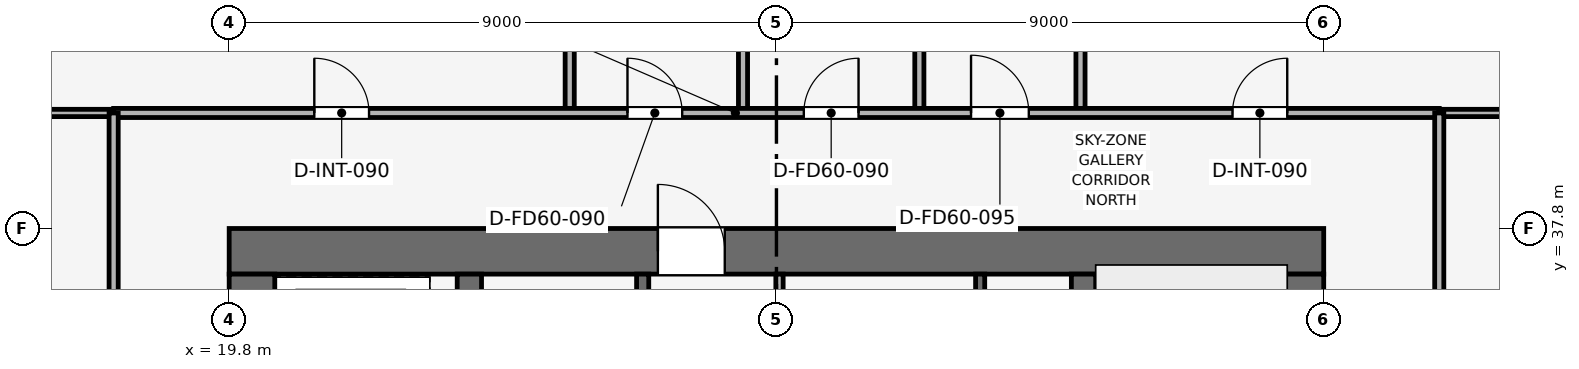
"""IFC4 building model, lengths in metres.
Left out: names, types, materials, properties, quantities, classifications, styles, units other than length and angle.
Written with IfcOpenShell. Run it as: python <this file> out.ifc"""

import sys

from ifc_helpers import new_model, si_unit, direction, frame, frame_2d, origin, place, context, subcontext, project, spatial, rectangle, extrude, element, fill, save


model = new_model("IFC4")
c1 = context("Model", 3, precision=1e-05, world=origin(), true_north=direction((0.0, 1.0)))
c2 = subcontext(c1, "Body", "Model", "MODEL_VIEW")
j1 = project(units=[si_unit("LENGTHUNIT", "METRE"), si_unit("PLANEANGLEUNIT", "RADIAN")], contexts=[c1])
p1 = place(None, origin())
s1 = spatial("IfcSite", under=j1, at=p1, CompositionType="ELEMENT")
p2 = place(p1, origin())
s2 = spatial("IfcBuilding", under=s1, at=p2, CompositionType="ELEMENT")
p3 = place(p2, frame((0.0, 0.0, 257.85)))
s3 = spatial("IfcBuildingStorey", under=s2, at=p3, CompositionType="ELEMENT", Elevation=257.85)
p4 = place(p3, frame((19.8, 37.425, 0.0), z_axis=(0.0, 0.0, 1.0), x_axis=(1.0, 0.0, 0.0)))
e1 = element("IfcWall", 1, at=p4, inside=s3, PredefinedType="SHEAR", context=c2, shape_type="SweptSolid", body=[
    extrude(rectangle(XDim=18.0, YDim=0.75, at=frame_2d((9.0, 0.0))), origin(), (0.0, 0.0, 1.0), 3.75),
])
p5 = place(p4, frame((7.05, 0.0, 0.0)))
e2 = element("IfcOpeningElement", 2, at=p5, cuts=e1, PredefinedType="OPENING", context=c2, shape_type="SweptSolid", body=[
    extrude(rectangle(XDim=1.1, YDim=2.15, at=frame_2d((0.55, 1.075))), frame((0.0, 0.385, 0.0), z_axis=(0.0, -1.0, 0.0), x_axis=(1.0, 0.0, 0.0)), (0.0, 0.0, 1.0), 0.77),
])
p6 = place(p3, frame((20.175, 20.55, 0.0), z_axis=(0.0, 0.0, 1.0), x_axis=(0.0, 1.0, 0.0)))
e3 = element("IfcWall", 3, at=p6, inside=s3, PredefinedType="SHEAR", context=c2, shape_type="SweptSolid", body=[
    extrude(rectangle(XDim=16.5, YDim=0.75, at=frame_2d((8.25, 0.0))), origin(), (0.0, 0.0, 1.0), 3.75),
])
p7 = place(p6, frame((10.25, 0.0, 0.0)))
e4 = element("IfcOpeningElement", 4, at=p7, cuts=e3, PredefinedType="OPENING", context=c2, shape_type="SweptSolid", body=[
    extrude(rectangle(XDim=1.1, YDim=2.15, at=frame_2d((0.55, 1.075))), frame((0.0, 0.385, 0.0), z_axis=(0.0, -1.0, 0.0), x_axis=(1.0, 0.0, 0.0)), (0.0, 0.0, 1.0), 0.77),
])
p8 = place(p3, frame((37.425, 20.55, 0.0), z_axis=(0.0, 0.0, 1.0), x_axis=(0.0, 1.0, 0.0)))
e5 = element("IfcWall", 5, at=p8, inside=s3, PredefinedType="SHEAR", context=c2, shape_type="SweptSolid", body=[
    extrude(rectangle(XDim=16.5, YDim=0.75, at=frame_2d((8.25, 0.0))), origin(), (0.0, 0.0, 1.0), 3.75),
])
p9 = place(p8, frame((4.75, 0.0, 0.0)))
e6 = element("IfcOpeningElement", 6, at=p9, cuts=e5, PredefinedType="OPENING", context=c2, shape_type="SweptSolid", body=[
    extrude(rectangle(XDim=1.1, YDim=2.15, at=frame_2d((0.55, 1.075))), frame((0.0, 0.385, 0.0), z_axis=(0.0, -1.0, 0.0), x_axis=(1.0, 0.0, 0.0)), (0.0, 0.0, 1.0), 0.77),
])
for number, where, z_axis, x_axis in (
    (7, (23.75, 20.55, 0.0), (0.0, 0.0, 1.0), (0.0, 1.0, 0.0)),
    (8, (33.85, 20.55, 0.0), (0.0, 0.0, 1.0), (0.0, 1.0, 0.0)),
):
    element("IfcWall", number, at=place(p3, frame(where, z_axis=z_axis, x_axis=x_axis)), inside=s3, PredefinedType="SHEAR", context=c2, shape_type="SweptSolid", body=[
        extrude(rectangle(XDim=16.5, YDim=0.4, at=frame_2d((8.25, 0.0))), origin(), (0.0, 0.0, 1.0), 3.75),
    ])
p10 = place(p3, frame((32.15, 34.0, 0.0), z_axis=(0.0, 0.0, 1.0), x_axis=(0.0, 1.0, 0.0)))
e9 = element("IfcWall", 9, at=p10, inside=s3, PredefinedType="SHEAR", context=c2, shape_type="SweptSolid", body=[
    extrude(rectangle(XDim=3.05, YDim=0.15, at=frame_2d((1.525, 0.0))), origin(), (0.0, 0.0, 1.0), 3.5),
])
p11 = place(p3, frame((26.6, 34.0, 0.0), z_axis=(0.0, 0.0, 1.0), x_axis=(0.0, 1.0, 0.0)))
e10 = element("IfcWall", 10, at=p11, inside=s3, PredefinedType="SHEAR", context=c2, shape_type="SweptSolid", body=[
    extrude(rectangle(XDim=3.05, YDim=0.2, at=frame_2d((1.525, 0.0))), origin(), (0.0, 0.0, 1.0), 3.5),
])
p12 = place(p11, frame((0.75, 0.0, 0.0)))
e11 = element("IfcOpeningElement", 11, at=p12, cuts=e10, PredefinedType="OPENING", context=c2, shape_type="SweptSolid", body=[
    extrude(rectangle(XDim=1.1, YDim=2.15, at=frame_2d((0.55, 1.075))), frame((0.0, 0.11, 0.0), z_axis=(0.0, -1.0, 0.0), x_axis=(1.0, 0.0, 0.0)), (0.0, 0.0, 1.0), 0.22),
])
p13 = place(p3, frame((28.85, 33.925, 0.0), z_axis=(0.0, 0.0, 1.0), x_axis=(0.0, 1.0, 0.0)))
e12 = element("IfcWall", 12, at=p13, inside=s3, PredefinedType="PARTITIONING", context=c2, shape_type="SweptSolid", body=[
    extrude(rectangle(XDim=3.125, YDim=0.12, at=frame_2d((1.562, 0.0))), origin(), (0.0, 0.0, 1.0), 3.5),
])
p14 = place(p13, frame((0.25, 0.0, 0.0)))
e13 = element("IfcOpeningElement", 13, at=p14, cuts=e12, PredefinedType="OPENING", context=c2, shape_type="SweptSolid", body=[
    extrude(rectangle(XDim=0.85, YDim=2.1, at=frame_2d((0.425, 1.05))), frame((0.0, 0.07, 0.0), z_axis=(0.0, -1.0, 0.0), x_axis=(1.0, 0.0, 0.0)), (0.0, 0.0, 1.0), 0.14),
])
p15 = place(p13, frame((1.72, 0.0, 0.0)))
e14 = element("IfcOpeningElement", 14, at=p15, cuts=e12, PredefinedType="OPENING", context=c2, shape_type="SweptSolid", body=[
    extrude(rectangle(XDim=0.85, YDim=2.1, at=frame_2d((0.425, 1.05))), frame((0.0, 0.07, 0.0), z_axis=(0.0, -1.0, 0.0), x_axis=(1.0, 0.0, 0.0)), (0.0, 0.0, 1.0), 0.14),
])
p16 = place(p3, frame((25.4, 39.7, 0.0), z_axis=(0.0, 0.0, 1.0), x_axis=(0.0, 1.0, 0.0)))
e15 = element("IfcWall", 15, at=p16, inside=s3, PredefinedType="PARTITIONING", context=c2, shape_type="SweptSolid", body=[
    extrude(rectangle(XDim=13.87, YDim=0.15, at=frame_2d((6.935, 0.0))), origin(), (0.0, 0.0, 1.0), 3.085),
])
p17 = place(p16, frame((8.035, 0.0, 0.0)))
e16 = element("IfcOpeningElement", 16, at=p17, cuts=e15, PredefinedType="OPENING", context=c2, shape_type="SweptSolid", body=[
    extrude(rectangle(XDim=0.9, YDim=2.1, at=frame_2d((0.45, 1.05))), frame((0.0, 0.085, 0.0), z_axis=(0.0, -1.0, 0.0), x_axis=(1.0, 0.0, 0.0)), (0.0, 0.0, 1.0), 0.17),
])
p18 = place(p3, frame((33.8, 39.7, 0.0), z_axis=(0.0, 0.0, 1.0), x_axis=(0.0, 1.0, 0.0)))
e17 = element("IfcWall", 17, at=p18, inside=s3, PredefinedType="PARTITIONING", context=c2, shape_type="SweptSolid", body=[
    extrude(rectangle(XDim=13.87, YDim=0.15, at=frame_2d((6.935, 0.0))), origin(), (0.0, 0.0, 1.0), 3.085),
])
for number, where, z_axis, x_axis in (
    (18, (28.25, 39.7, 0.0), (0.0, 0.0, 1.0), (0.0, 1.0, 0.0)),
    (19, (31.15, 39.7, 0.0), (0.0, 0.0, 1.0), (0.0, 1.0, 0.0)),
):
    element("IfcWall", number, at=place(p3, frame(where, z_axis=z_axis, x_axis=x_axis)), inside=s3, PredefinedType="PARTITIONING", context=c2, shape_type="SweptSolid", body=[
        extrude(rectangle(XDim=3.1, YDim=0.15, at=frame_2d((1.55, 0.0))), origin(), (0.0, 0.0, 1.0), 3.5),
    ])
p19 = place(p3, frame((4.03, 39.7, 0.0), z_axis=(0.0, 0.0, 1.0), x_axis=(1.0, 0.0, 0.0)))
e20 = element("IfcWall", 20, at=p19, inside=s3, PredefinedType="PARTITIONING", context=c2, shape_type="SweptSolid", body=[
    extrude(rectangle(XDim=13.87, YDim=0.12, at=frame_2d((6.935, 0.0))), origin(), (0.0, 0.0, 1.0), 3.085),
])
p20 = place(p3, frame((39.7, 39.7, 0.0), z_axis=(0.0, 0.0, 1.0), x_axis=(1.0, 0.0, 0.0)))
e21 = element("IfcWall", 21, at=p20, inside=s3, PredefinedType="PARTITIONING", context=c2, shape_type="SweptSolid", body=[
    extrude(rectangle(XDim=13.87, YDim=0.12, at=frame_2d((6.935, 0.0))), origin(), (0.0, 0.0, 1.0), 3.085),
])
p21 = place(p3, frame((17.9, 39.7, 0.0), z_axis=(0.0, 0.0, 1.0), x_axis=(1.0, 0.0, 0.0)))
e22 = element("IfcWall", 22, at=p21, inside=s3, PredefinedType="PARTITIONING", context=c2, shape_type="SweptSolid", body=[
    extrude(rectangle(XDim=21.8, YDim=0.15, at=frame_2d((10.9, 0.0))), origin(), (0.0, 0.0, 1.0), 3.085),
])
p22 = place(p21, frame((3.3, 0.0, 0.0)))
e23 = element("IfcOpeningElement", 23, at=p22, cuts=e22, PredefinedType="OPENING", context=c2, shape_type="SweptSolid", body=[
    extrude(rectangle(XDim=0.9, YDim=2.1, at=frame_2d((0.45, 1.05))), frame((0.0, 0.085, 0.0), z_axis=(0.0, -1.0, 0.0), x_axis=(1.0, 0.0, 0.0)), (0.0, 0.0, 1.0), 0.17),
])
p23 = place(p21, frame((8.45, 0.0, 0.0)))
e24 = element("IfcOpeningElement", 24, at=p23, cuts=e22, PredefinedType="OPENING", context=c2, shape_type="SweptSolid", body=[
    extrude(rectangle(XDim=0.9, YDim=2.1, at=frame_2d((0.45, 1.05))), frame((0.0, 0.085, 0.0), z_axis=(0.0, -1.0, 0.0), x_axis=(1.0, 0.0, 0.0)), (0.0, 0.0, 1.0), 0.17),
])
p24 = place(p21, frame((11.35, 0.0, 0.0)))
e25 = element("IfcOpeningElement", 25, at=p24, cuts=e22, PredefinedType="OPENING", context=c2, shape_type="SweptSolid", body=[
    extrude(rectangle(XDim=0.9, YDim=2.1, at=frame_2d((0.45, 1.05))), frame((0.0, 0.085, 0.0), z_axis=(0.0, -1.0, 0.0), x_axis=(1.0, 0.0, 0.0)), (0.0, 0.0, 1.0), 0.17),
])
p25 = place(p21, frame((14.1, 0.0, 0.0)))
e26 = element("IfcOpeningElement", 26, at=p25, cuts=e22, PredefinedType="OPENING", context=c2, shape_type="SweptSolid", body=[
    extrude(rectangle(XDim=0.95, YDim=2.1, at=frame_2d((0.475, 1.05))), frame((0.0, 0.085, 0.0), z_axis=(0.0, -1.0, 0.0), x_axis=(1.0, 0.0, 0.0)), (0.0, 0.0, 1.0), 0.17),
])
p26 = place(p21, frame((18.4, 0.0, 0.0)))
e27 = element("IfcOpeningElement", 27, at=p26, cuts=e22, PredefinedType="OPENING", context=c2, shape_type="SweptSolid", body=[
    extrude(rectangle(XDim=0.9, YDim=2.1, at=frame_2d((0.45, 1.05))), frame((0.0, 0.085, 0.0), z_axis=(0.0, -1.0, 0.0), x_axis=(1.0, 0.0, 0.0)), (0.0, 0.0, 1.0), 0.17),
])
p27 = place(p3, frame((17.9, 10.8, 0.0), z_axis=(0.0, 0.0, 1.0), x_axis=(0.0, 1.0, 0.0)))
e28 = element("IfcWall", 28, at=p27, inside=s3, PredefinedType="PARTITIONING", context=c2, shape_type="SweptSolid", body=[
    extrude(rectangle(XDim=28.9, YDim=0.15, at=frame_2d((14.45, 0.0))), origin(), (0.0, 0.0, 1.0), 3.085),
])
p28 = place(p27, frame((0.7, 0.0, 0.0)))
e29 = element("IfcOpeningElement", 29, at=p28, cuts=e28, PredefinedType="OPENING", context=c2, shape_type="SweptSolid", body=[
    extrude(rectangle(XDim=0.9, YDim=2.1, at=frame_2d((0.45, 1.05))), frame((0.0, 0.085, 0.0), z_axis=(0.0, -1.0, 0.0), x_axis=(1.0, 0.0, 0.0)), (0.0, 0.0, 1.0), 0.17),
])
p29 = place(p27, frame((5.952, 0.0, 0.0)))
e30 = element("IfcOpeningElement", 30, at=p29, cuts=e28, PredefinedType="OPENING", context=c2, shape_type="SweptSolid", body=[
    extrude(rectangle(XDim=0.9, YDim=2.1, at=frame_2d((0.45, 1.05))), frame((0.0, 0.085, 0.0), z_axis=(0.0, -1.0, 0.0), x_axis=(1.0, 0.0, 0.0)), (0.0, 0.0, 1.0), 0.17),
])
p30 = place(p27, frame((14.02, 0.0, 0.0)))
e31 = element("IfcOpeningElement", 31, at=p30, cuts=e28, PredefinedType="OPENING", context=c2, shape_type="SweptSolid", body=[
    extrude(rectangle(XDim=0.9, YDim=2.1, at=frame_2d((0.45, 1.05))), frame((0.0, 0.085, 0.0), z_axis=(0.0, -1.0, 0.0), x_axis=(1.0, 0.0, 0.0)), (0.0, 0.0, 1.0), 0.17),
])
p31 = place(p27, frame((23.217, 0.0, 0.0)))
e32 = element("IfcOpeningElement", 32, at=p31, cuts=e28, PredefinedType="OPENING", context=c2, shape_type="SweptSolid", body=[
    extrude(rectangle(XDim=0.9, YDim=2.1, at=frame_2d((0.45, 1.05))), frame((0.0, 0.085, 0.0), z_axis=(0.0, -1.0, 0.0), x_axis=(1.0, 0.0, 0.0)), (0.0, 0.0, 1.0), 0.17),
])
p32 = place(p3, frame((39.7, 24.4, 0.0), z_axis=(0.0, 0.0, 1.0), x_axis=(0.0, 1.0, 0.0)))
e33 = element("IfcWall", 33, at=p32, inside=s3, PredefinedType="PARTITIONING", context=c2, shape_type="SweptSolid", body=[
    extrude(rectangle(XDim=15.3, YDim=0.15, at=frame_2d((7.65, 0.0))), origin(), (0.0, 0.0, 1.0), 3.085),
])
p33 = place(p32, frame((3.032, 0.0, 0.0)))
e34 = element("IfcOpeningElement", 34, at=p33, cuts=e33, PredefinedType="OPENING", context=c2, shape_type="SweptSolid", body=[
    extrude(rectangle(XDim=0.9, YDim=2.1, at=frame_2d((0.45, 1.05))), frame((0.0, 0.085, 0.0), z_axis=(0.0, -1.0, 0.0), x_axis=(1.0, 0.0, 0.0)), (0.0, 0.0, 1.0), 0.17),
])
p34 = place(p32, frame((10.682, 0.0, 0.0)))
e35 = element("IfcOpeningElement", 35, at=p34, cuts=e33, PredefinedType="OPENING", context=c2, shape_type="SweptSolid", body=[
    extrude(rectangle(XDim=0.9, YDim=2.1, at=frame_2d((0.45, 1.05))), frame((0.0, 0.085, 0.0), z_axis=(0.0, -1.0, 0.0), x_axis=(1.0, 0.0, 0.0)), (0.0, 0.0, 1.0), 0.17),
])
p35 = place(p22, origin())
e36 = element("IfcDoor", 36, at=p35, inside=s3, OperationType="SINGLE_SWING_LEFT", PredefinedType="DOOR", context=c2, shape_type="SweptSolid", body=[
    extrude(rectangle(XDim=0.9, YDim=2.1, at=frame_2d((0.45, 1.05))), frame((0.0, 0.025, 0.0), z_axis=(0.0, -1.0, 0.0), x_axis=(1.0, 0.0, 0.0)), (0.0, 0.0, 1.0), 0.05),
])
fill(e23, e36)
p36 = place(p23, origin())
e37 = element("IfcDoor", 37, at=p36, inside=s3, OperationType="SINGLE_SWING_LEFT", PredefinedType="DOOR", context=c2, shape_type="SweptSolid", body=[
    extrude(rectangle(XDim=0.9, YDim=2.1, at=frame_2d((0.45, 1.05))), frame((0.0, 0.025, 0.0), z_axis=(0.0, -1.0, 0.0), x_axis=(1.0, 0.0, 0.0)), (0.0, 0.0, 1.0), 0.05),
])
fill(e24, e37)
p37 = place(p24, origin())
e38 = element("IfcDoor", 38, at=p37, inside=s3, OperationType="SINGLE_SWING_RIGHT", PredefinedType="DOOR", context=c2, shape_type="SweptSolid", body=[
    extrude(rectangle(XDim=0.9, YDim=2.1, at=frame_2d((0.45, 1.05))), frame((0.0, 0.025, 0.0), z_axis=(0.0, -1.0, 0.0), x_axis=(1.0, 0.0, 0.0)), (0.0, 0.0, 1.0), 0.05),
])
fill(e25, e38)
p38 = place(p25, origin())
e39 = element("IfcDoor", 39, at=p38, inside=s3, OperationType="SINGLE_SWING_LEFT", PredefinedType="DOOR", context=c2, shape_type="SweptSolid", body=[
    extrude(rectangle(XDim=0.95, YDim=2.1, at=frame_2d((0.475, 1.05))), frame((0.0, 0.025, 0.0), z_axis=(0.0, -1.0, 0.0), x_axis=(1.0, 0.0, 0.0)), (0.0, 0.0, 1.0), 0.05),
])
fill(e26, e39)
p39 = place(p26, origin())
e40 = element("IfcDoor", 40, at=p39, inside=s3, OperationType="SINGLE_SWING_RIGHT", PredefinedType="DOOR", context=c2, shape_type="SweptSolid", body=[
    extrude(rectangle(XDim=0.9, YDim=2.1, at=frame_2d((0.45, 1.05))), frame((0.0, 0.025, 0.0), z_axis=(0.0, -1.0, 0.0), x_axis=(1.0, 0.0, 0.0)), (0.0, 0.0, 1.0), 0.05),
])
fill(e27, e40)
p40 = place(p5, origin())
e41 = element("IfcDoor", 41, at=p40, inside=s3, OperationType="SINGLE_SWING_LEFT", PredefinedType="DOOR", context=c2, shape_type="SweptSolid", body=[
    extrude(rectangle(XDim=1.1, YDim=2.15, at=frame_2d((0.55, 1.075))), frame((0.0, 0.025, 0.0), z_axis=(0.0, -1.0, 0.0), x_axis=(1.0, 0.0, 0.0)), (0.0, 0.0, 1.0), 0.05),
])
fill(e2, e41)
save(model, sys.argv[1])
